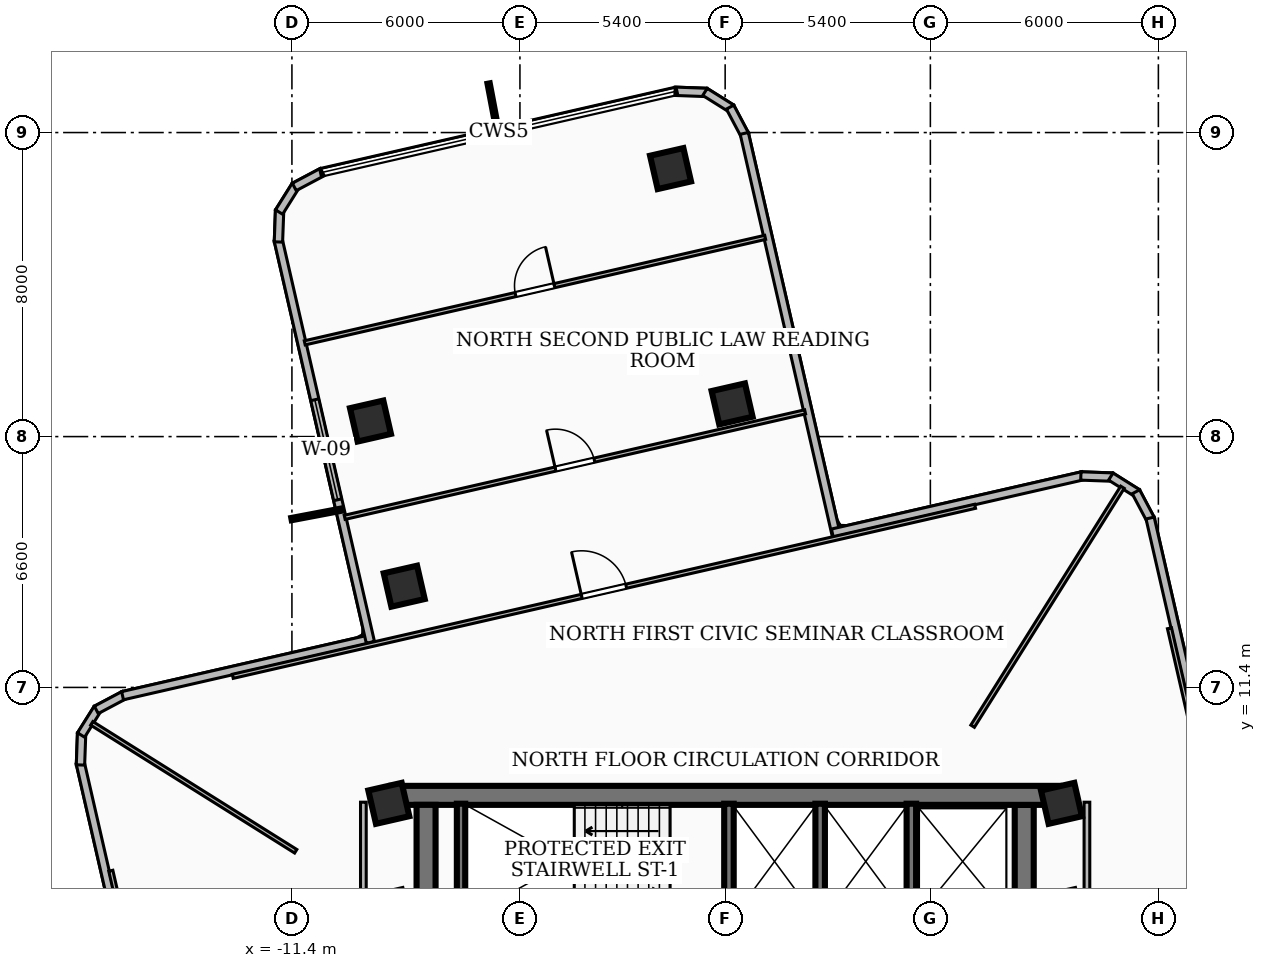
"""IFC4 building model, lengths in metres.
Left out: names, types, materials, properties, quantities, classifications, styles, units other than length and angle.
Written with IfcOpenShell. Run it as: python <this file> out.ifc"""

import sys

from ifc_helpers import new_model, si_unit, direction, frame, frame_2d, origin, origin_2d, place, context, subcontext, project, spatial, rectangle, extrude, element, fill, save


model = new_model("IFC4")
c1 = context("Model", 3, precision=1e-05, world=origin(), true_north=direction((0.0, 1.0)))
c2 = subcontext(c1, "Body", "Model", "MODEL_VIEW")
j1 = project(units=[si_unit("LENGTHUNIT", "METRE"), si_unit("PLANEANGLEUNIT", "RADIAN")], contexts=[c1])
p1 = place(None, origin())
s1 = spatial("IfcSite", under=j1, at=p1, CompositionType="ELEMENT")
p2 = place(p1, origin())
s2 = spatial("IfcBuilding", under=s1, at=p2, CompositionType="ELEMENT")
p3 = place(p2, frame((0.0, 0.0, 119.88)))
s3 = spatial("IfcBuildingStorey", under=s2, at=p3, CompositionType="ELEMENT", Elevation=119.88)
p4 = place(p3, frame((-8.78, 8.56, 0.0), z_axis=(0.0, 0.0, 1.0), x_axis=(1.0, 0.0, 0.0)))
e1 = element("IfcWall", 1, at=p4, inside=s3, PredefinedType="SHEAR", context=c2, shape_type="SweptSolid", body=[
    extrude(rectangle(XDim=17.56, YDim=0.5, at=frame_2d((8.78, 0.0))), origin(), (0.0, 0.0, 1.0), 3.34),
])
for number, where, z_axis, x_axis in (
    (2, (-7.87, 2.0, 0.0), (0.0, 0.0, 1.0), (0.0, 1.0, 0.0)),
    (3, (7.87, 8.31, 0.0), (0.0, 0.0, 1.0), (0.0, -1.0, 0.0)),
):
    element("IfcWall", number, at=place(p3, frame(where, z_axis=z_axis, x_axis=x_axis)), inside=s3, PredefinedType="SHEAR", context=c2, shape_type="SweptSolid", body=[
        extrude(rectangle(XDim=6.31, YDim=0.5, at=frame_2d((3.155, 0.0))), origin(), (0.0, 0.0, 1.0), 3.34),
    ])
p5 = place(p3, frame((-6.95, 5.28, 0.0), z_axis=(0.0, 0.0, 1.0), x_axis=(0.0, 1.0, 0.0)))
e4 = element("IfcWall", 4, at=p5, inside=s3, PredefinedType="SOLIDWALL", context=c2, shape_type="SweptSolid", body=[
    extrude(rectangle(XDim=3.06, YDim=0.22, at=frame_2d((1.53, 0.0))), origin(), (0.0, 0.0, 1.0), 3.34),
])
for number, where, z_axis, x_axis in (
    (5, (0.1, 5.3, 0.0), (0.0, 0.0, 1.0), (0.0, 1.0, 0.0)),
    (6, (2.5, 5.3, 0.0), (0.0, 0.0, 1.0), (0.0, 1.0, 0.0)),
    (7, (4.9, 5.3, 0.0), (0.0, 0.0, 1.0), (0.0, 1.0, 0.0)),
):
    element("IfcWall", number, at=place(p3, frame(where, z_axis=z_axis, x_axis=x_axis)), inside=s3, PredefinedType="SOLIDWALL", context=c2, shape_type="SweptSolid", body=[
        extrude(rectangle(XDim=3.04, YDim=0.25, at=frame_2d((1.52, 0.0))), origin(), (0.0, 0.0, 1.0), 3.34),
    ])
for number, where, z_axis, x_axis in (
    (8, (-8.85, 8.35, 0.0), (0.0, 0.0, 1.0), (0.975, 0.223, 0.0)),
    (9, (8.85, 8.35, 0.0), (0.0, 0.0, 1.0), (0.975, 0.223, 0.0)),
    (10, (0.183, 18.86, 0.0), (0.0, 0.0, 1.0), (0.975, 0.223, 0.0)),
    (11, (-8.445, 14.064, 0.0), (0.0, 0.0, 1.0), (0.975, 0.223, 0.0)),
    (12, (-1.437, 25.052, 0.0), (0.0, 0.0, 1.0), (0.975, 0.223, 0.0)),
    (13, (-9.333, 18.409, 0.0), (0.0, 0.0, 1.0), (0.975, 0.223, 0.0)),
):
    element("IfcColumn", number, at=place(p3, frame(where, z_axis=z_axis, x_axis=x_axis)), inside=s3, PredefinedType="COLUMN", context=c2, shape_type="SweptSolid", body=[
        extrude(rectangle(XDim=0.9, YDim=0.9, at=origin_2d()), origin(), (0.0, 0.0, 1.0), 3.6),
    ])
p6 = place(p3, frame((-15.46, 2.821, 0.0), z_axis=(0.0, 0.0, 1.0), x_axis=(-0.223278912438, 0.974754598481, 0.0)))
e14 = element("IfcWall", 14, at=p6, inside=s3, PredefinedType="SOLIDWALL", context=c2, shape_type="SweptSolid", body=[
    extrude(rectangle(XDim=6.759, YDim=0.22, at=frame_2d((3.379, 0.0))), origin(), (0.0, 0.0, 1.0), 3.34),
])
p7 = place(p3, frame((-16.964, 9.36, 0.0), z_axis=(0.0, 0.0, 1.0), x_axis=(0.035983706773, 0.999352376715, 0.0)))
e15 = element("IfcWall", 15, at=p7, inside=s3, PredefinedType="SOLIDWALL", context=c2, shape_type="SweptSolid", body=[
    extrude(rectangle(XDim=0.834, YDim=0.22, at=frame_2d((0.417, 0.0))), origin(), (0.0, 0.0, 1.0), 3.34),
])
p8 = place(p3, frame((-16.948, 10.148, 0.0), z_axis=(0.0, 0.0, 1.0), x_axis=(0.531096868492, 0.847311109497, 0.0)))
e16 = element("IfcWall", 16, at=p8, inside=s3, PredefinedType="SOLIDWALL", context=c2, shape_type="SweptSolid", body=[
    extrude(rectangle(XDim=0.819, YDim=0.22, at=frame_2d((0.41, 0.0))), origin(), (0.0, 0.0, 1.0), 3.34),
])
p9 = place(p3, frame((-16.548, 10.809, 0.0), z_axis=(0.0, 0.0, 1.0), x_axis=(0.883460266876, 0.468506090516, 0.0)))
e17 = element("IfcWall", 17, at=p9, inside=s3, PredefinedType="SOLIDWALL", context=c2, shape_type="SweptSolid", body=[
    extrude(rectangle(XDim=0.834, YDim=0.22, at=frame_2d((0.417, 0.0))), origin(), (0.0, 0.0, 1.0), 3.34),
])
p10 = place(p3, frame((-15.857, 11.182, 0.0), z_axis=(0.0, 0.0, 1.0), x_axis=(0.974754598481, 0.223278912438, 0.0)))
e18 = element("IfcWall", 18, at=p10, inside=s3, PredefinedType="SOLIDWALL", context=c2, shape_type="SweptSolid", body=[
    extrude(rectangle(XDim=6.759, YDim=0.22, at=frame_2d((3.379, 0.0))), origin(), (0.0, 0.0, 1.0), 3.34),
])
p11 = place(p3, frame((-9.335, 12.585, 0.0), z_axis=(0.0, 0.0, 1.0), x_axis=(-0.22331741435, 0.974745778369, 0.0)))
e19 = element("IfcWall", 19, at=p11, inside=s3, PredefinedType="SOLIDWALL", context=c2, shape_type="SweptSolid", body=[
    extrude(rectangle(XDim=10.859, YDim=0.22, at=frame_2d((5.43, 0.0))), origin(), (0.0, 0.0, 1.0), 3.34),
])
p12 = place(p11, frame((3.85, 0.0, 0.85)))
e20 = element("IfcOpeningElement", 20, at=p12, cuts=e19, PredefinedType="OPENING", context=c2, shape_type="SweptSolid", body=[
    extrude(rectangle(XDim=2.7, YDim=1.65, at=frame_2d((1.35, 0.825))), frame((0.0, 0.12, 0.0), z_axis=(0.0, -1.0, 0.0), x_axis=(1.0, 0.0, 0.0)), (0.0, 0.0, 1.0), 0.24),
])
p13 = place(p3, frame((-11.755, 23.121, 0.0), z_axis=(0.0, 0.0, 1.0), x_axis=(0.036903333482, 0.999318839999, 0.0)))
e21 = element("IfcWall", 21, at=p13, inside=s3, PredefinedType="SOLIDWALL", context=c2, shape_type="SweptSolid", body=[
    extrude(rectangle(XDim=0.833, YDim=0.22, at=frame_2d((0.417, 0.0))), origin(), (0.0, 0.0, 1.0), 3.34),
])
p14 = place(p3, frame((-11.738, 23.908, 0.0), z_axis=(0.0, 0.0, 1.0), x_axis=(0.531096868492, 0.847311109497, 0.0)))
e22 = element("IfcWall", 22, at=p14, inside=s3, PredefinedType="SOLIDWALL", context=c2, shape_type="SweptSolid", body=[
    extrude(rectangle(XDim=0.819, YDim=0.22, at=frame_2d((0.41, 0.0))), origin(), (0.0, 0.0, 1.0), 3.34),
])
p15 = place(p3, frame((-11.338, 24.569, 0.0), z_axis=(0.0, 0.0, 1.0), x_axis=(0.883396009524, 0.468627240307, 0.0)))
e23 = element("IfcWall", 23, at=p15, inside=s3, PredefinedType="SOLIDWALL", context=c2, shape_type="SweptSolid", body=[
    extrude(rectangle(XDim=0.834, YDim=0.22, at=frame_2d((0.417, 0.0))), origin(), (0.0, 0.0, 1.0), 3.34),
])
p16 = place(p3, frame((-1.319, 27.086, 0.0), z_axis=(0.0, 0.0, 1.0), x_axis=(0.999309614288, -0.037152318798, 0.0)))
e24 = element("IfcWall", 24, at=p16, inside=s3, PredefinedType="SOLIDWALL", context=c2, shape_type="SweptSolid", body=[
    extrude(rectangle(XDim=0.834, YDim=0.22, at=frame_2d((0.417, 0.0))), origin(), (0.0, 0.0, 1.0), 3.34),
])
p17 = place(p3, frame((-0.531, 27.069, 0.0), z_axis=(0.0, 0.0, 1.0), x_axis=(0.847311109497, -0.531096868492, 0.0)))
e25 = element("IfcWall", 25, at=p17, inside=s3, PredefinedType="SOLIDWALL", context=c2, shape_type="SweptSolid", body=[
    extrude(rectangle(XDim=0.819, YDim=0.22, at=frame_2d((0.41, 0.0))), origin(), (0.0, 0.0, 1.0), 3.34),
])
p18 = place(p3, frame((0.13, 26.669, 0.0), z_axis=(0.0, 0.0, 1.0), x_axis=(0.468734444521, -0.883339131092, 0.0)))
e26 = element("IfcWall", 26, at=p18, inside=s3, PredefinedType="SOLIDWALL", context=c2, shape_type="SweptSolid", body=[
    extrude(rectangle(XDim=0.834, YDim=0.22, at=frame_2d((0.417, 0.0))), origin(), (0.0, 0.0, 1.0), 3.34),
])
p19 = place(p3, frame((0.503, 25.978, 0.0), z_axis=(0.0, 0.0, 1.0), x_axis=(0.223251537739, -0.974760868571, 0.0)))
e27 = element("IfcWall", 27, at=p19, inside=s3, PredefinedType="SOLIDWALL", context=c2, shape_type="SweptSolid", body=[
    extrude(rectangle(XDim=10.858, YDim=0.22, at=frame_2d((5.429, 0.0))), origin(), (0.0, 0.0, 1.0), 2.57),
])
p20 = place(p3, frame((2.821, 15.46, 0.0), z_axis=(0.0, 0.0, 1.0), x_axis=(0.974754598481, 0.223278912438, 0.0)))
e28 = element("IfcWall", 28, at=p20, inside=s3, PredefinedType="SOLIDWALL", context=c2, shape_type="SweptSolid", body=[
    extrude(rectangle(XDim=6.759, YDim=0.22, at=frame_2d((3.379, 0.0))), origin(), (0.0, 0.0, 1.0), 2.57),
])
p21 = place(p3, frame((9.36, 16.964, 0.0), z_axis=(0.0, 0.0, 1.0), x_axis=(0.999352376715, -0.035983706773, 0.0)))
e29 = element("IfcWall", 29, at=p21, inside=s3, PredefinedType="SOLIDWALL", context=c2, shape_type="SweptSolid", body=[
    extrude(rectangle(XDim=0.834, YDim=0.22, at=frame_2d((0.417, 0.0))), origin(), (0.0, 0.0, 1.0), 3.34),
])
p22 = place(p3, frame((10.148, 16.948, 0.0), z_axis=(0.0, 0.0, 1.0), x_axis=(0.847311109497, -0.531096868492, 0.0)))
e30 = element("IfcWall", 30, at=p22, inside=s3, PredefinedType="SOLIDWALL", context=c2, shape_type="SweptSolid", body=[
    extrude(rectangle(XDim=0.819, YDim=0.22, at=frame_2d((0.41, 0.0))), origin(), (0.0, 0.0, 1.0), 3.34),
])
p23 = place(p3, frame((10.809, 16.548, 0.0), z_axis=(0.0, 0.0, 1.0), x_axis=(0.468506090516, -0.883460266876, 0.0)))
e31 = element("IfcWall", 31, at=p23, inside=s3, PredefinedType="SOLIDWALL", context=c2, shape_type="SweptSolid", body=[
    extrude(rectangle(XDim=0.834, YDim=0.22, at=frame_2d((0.417, 0.0))), origin(), (0.0, 0.0, 1.0), 3.34),
])
p24 = place(p3, frame((11.182, 15.857, 0.0), z_axis=(0.0, 0.0, 1.0), x_axis=(0.223278912438, -0.974754598481, 0.0)))
e32 = element("IfcWall", 32, at=p24, inside=s3, PredefinedType="SOLIDWALL", context=c2, shape_type="SweptSolid", body=[
    extrude(rectangle(XDim=6.759, YDim=0.22, at=frame_2d((3.379, 0.0))), origin(), (0.0, 0.0, 1.0), 3.34),
])
for number, where, z_axis, x_axis in (
    (33, (-9.52, 1.75, 0.0), (0.0, 0.0, 1.0), (0.0, 1.0, 0.0)),
    (34, (9.52, 1.75, 0.0), (0.0, 0.0, 1.0), (0.0, 1.0, 0.0)),
):
    element("IfcWall", number, at=place(p3, frame(where, z_axis=z_axis, x_axis=x_axis)), inside=s3, PredefinedType="PARTITIONING", context=c2, shape_type="SweptSolid", body=[
        extrude(rectangle(XDim=6.63, YDim=0.15, at=frame_2d((3.315, 0.0))), origin(), (0.0, 0.0, 1.0), 2.57),
    ])
p25 = place(p3, frame((6.512, 10.38, 0.0), z_axis=(0.0, 0.0, 1.0), x_axis=(0.531323053356, 0.847169294163, 0.0)))
e35 = element("IfcWall", 35, at=p25, inside=s3, PredefinedType="PARTITIONING", context=c2, shape_type="SweptSolid", body=[
    extrude(rectangle(XDim=7.421, YDim=0.11, at=frame_2d((3.711, 0.0))), origin(), (0.0, 0.0, 1.0), 2.57),
])
p26 = place(p3, frame((-11.3, 7.089, 0.0), z_axis=(0.0, 0.0, 1.0), x_axis=(-0.847172398776, 0.531318103167, 0.0)))
e36 = element("IfcWall", 36, at=p26, inside=s3, PredefinedType="PARTITIONING", context=c2, shape_type="SweptSolid", body=[
    extrude(rectangle(XDim=6.335, YDim=0.11, at=frame_2d((3.167, 0.0))), origin(), (0.0, 0.0, 1.0), 3.34),
])
p27 = place(p3, frame((11.692, 12.957, 0.0), z_axis=(0.0, 0.0, 1.0), x_axis=(0.223262093598, -0.97475845088, 0.0)))
e37 = element("IfcWall", 37, at=p27, inside=s3, PredefinedType="PARTITIONING", context=c2, shape_type="SweptSolid", body=[
    extrude(rectangle(XDim=20.04, YDim=0.11, at=frame_2d((10.02, 0.0))), origin(), (0.0, 0.0, 1.0), 2.57),
])
p28 = place(p27, frame((9.42, 0.0, 0.0)))
e38 = element("IfcOpeningElement", 38, at=p28, cuts=e37, PredefinedType="OPENING", context=c2, shape_type="SweptSolid", body=[
    extrude(rectangle(XDim=1.2, YDim=2.1, at=frame_2d((0.6, 1.05))), frame((0.0, 0.065, 0.0), z_axis=(0.0, -1.0, 0.0), x_axis=(1.0, 0.0, 0.0)), (0.0, 0.0, 1.0), 0.13),
])
p29 = place(p3, frame((-12.957, 11.692, 0.0), z_axis=(0.0, 0.0, 1.0), x_axis=(0.97475845088, 0.223262093598, 0.0)))
e39 = element("IfcWall", 39, at=p29, inside=s3, PredefinedType="PARTITIONING", context=c2, shape_type="SweptSolid", body=[
    extrude(rectangle(XDim=20.04, YDim=0.11, at=frame_2d((10.02, 0.0))), origin(), (0.0, 0.0, 1.0), 2.57),
])
p30 = place(p29, frame((9.42, 0.0, 0.0)))
e40 = element("IfcOpeningElement", 40, at=p30, cuts=e39, PredefinedType="OPENING", context=c2, shape_type="SweptSolid", body=[
    extrude(rectangle(XDim=1.2, YDim=2.1, at=frame_2d((0.6, 1.05))), frame((0.0, 0.065, 0.0), z_axis=(0.0, -1.0, 0.0), x_axis=(1.0, 0.0, 0.0)), (0.0, 0.0, 1.0), 0.13),
])
p31 = place(p3, frame((-10.012, 15.875, 0.0), z_axis=(0.0, 0.0, 1.0), x_axis=(0.974744523099, 0.223322893337, 0.0)))
e41 = element("IfcWall", 41, at=p31, inside=s3, PredefinedType="PARTITIONING", context=c2, shape_type="SweptSolid", body=[
    extrude(rectangle(XDim=12.43, YDim=0.11, at=frame_2d((6.215, 0.0))), origin(), (0.0, 0.0, 1.0), 2.57),
])
p32 = place(p31, frame((5.69, 0.0, 0.0)))
e42 = element("IfcOpeningElement", 42, at=p32, cuts=e41, PredefinedType="OPENING", context=c2, shape_type="SweptSolid", body=[
    extrude(rectangle(XDim=1.05, YDim=2.08, at=frame_2d((0.525, 1.04))), frame((0.0, 0.065, 0.0), z_axis=(0.0, -1.0, 0.0), x_axis=(1.0, 0.0, 0.0)), (0.0, 0.0, 1.0), 0.13),
])
p33 = place(p3, frame((-11.063, 20.466, 0.0), z_axis=(0.0, 0.0, 1.0), x_axis=(0.974744523099, 0.223322893337, 0.0)))
e43 = element("IfcWall", 43, at=p33, inside=s3, PredefinedType="PARTITIONING", context=c2, shape_type="SweptSolid", body=[
    extrude(rectangle(XDim=12.43, YDim=0.11, at=frame_2d((6.215, 0.0))), origin(), (0.0, 0.0, 1.0), 2.57),
])
p34 = place(p33, frame((5.69, 0.0, 0.0)))
e44 = element("IfcOpeningElement", 44, at=p34, cuts=e43, PredefinedType="OPENING", context=c2, shape_type="SweptSolid", body=[
    extrude(rectangle(XDim=1.05, YDim=2.08, at=frame_2d((0.525, 1.04))), frame((0.0, 0.065, 0.0), z_axis=(0.0, -1.0, 0.0), x_axis=(1.0, 0.0, 0.0)), (0.0, 0.0, 1.0), 0.13),
])
p35 = place(p3, frame((-11.692, -12.957, 0.0), z_axis=(0.0, 0.0, 1.0), x_axis=(-0.223262093598, 0.97475845088, 0.0)))
e45 = element("IfcWall", 45, at=p35, inside=s3, PredefinedType="PARTITIONING", context=c2, shape_type="SweptSolid", body=[
    extrude(rectangle(XDim=20.04, YDim=0.11, at=frame_2d((10.02, 0.0))), origin(), (0.0, 0.0, 1.0), 2.57),
])
p36 = place(p35, frame((9.42, 0.0, 0.0)))
e46 = element("IfcOpeningElement", 46, at=p36, cuts=e45, PredefinedType="OPENING", context=c2, shape_type="SweptSolid", body=[
    extrude(rectangle(XDim=1.2, YDim=2.1, at=frame_2d((0.6, 1.05))), frame((0.0, 0.065, 0.0), z_axis=(0.0, -1.0, 0.0), x_axis=(1.0, 0.0, 0.0)), (0.0, 0.0, 1.0), 0.13),
])
p37 = place(p12, origin())
e47 = element("IfcWindow", 47, at=p37, inside=s3, PartitioningType="SINGLE_PANEL", PredefinedType="WINDOW", context=c2, shape_type="SweptSolid", body=[
    extrude(rectangle(XDim=2.7, YDim=1.65, at=frame_2d((1.35, 0.825))), frame((0.0, 0.03, 0.0), z_axis=(0.0, -1.0, 0.0), x_axis=(1.0, 0.0, 0.0)), (0.0, 0.0, 1.0), 0.06),
])
fill(e20, e47)
p38 = place(p30, origin())
e48 = element("IfcDoor", 48, at=p38, inside=s3, OperationType="SINGLE_SWING_LEFT", PredefinedType="DOOR", context=c2, shape_type="SweptSolid", body=[
    extrude(rectangle(XDim=1.2, YDim=2.1, at=frame_2d((0.6, 1.05))), frame((0.0, 0.025, 0.0), z_axis=(0.0, -1.0, 0.0), x_axis=(1.0, 0.0, 0.0)), (0.0, 0.0, 1.0), 0.05),
])
fill(e40, e48)
p39 = place(p32, origin())
e49 = element("IfcDoor", 49, at=p39, inside=s3, OperationType="SINGLE_SWING_LEFT", PredefinedType="DOOR", context=c2, shape_type="SweptSolid", body=[
    extrude(rectangle(XDim=1.05, YDim=2.08, at=frame_2d((0.525, 1.04))), frame((0.0, 0.025, 0.0), z_axis=(0.0, -1.0, 0.0), x_axis=(1.0, 0.0, 0.0)), (0.0, 0.0, 1.0), 0.05),
])
fill(e42, e49)
p40 = place(p34, origin())
e50 = element("IfcDoor", 50, at=p40, inside=s3, OperationType="SINGLE_SWING_RIGHT", PredefinedType="DOOR", context=c2, shape_type="SweptSolid", body=[
    extrude(rectangle(XDim=1.05, YDim=2.08, at=frame_2d((0.525, 1.04))), frame((0.0, 0.025, 0.0), z_axis=(0.0, -1.0, 0.0), x_axis=(1.0, 0.0, 0.0)), (0.0, 0.0, 1.0), 0.05),
])
fill(e44, e50)
save(model, sys.argv[1])
